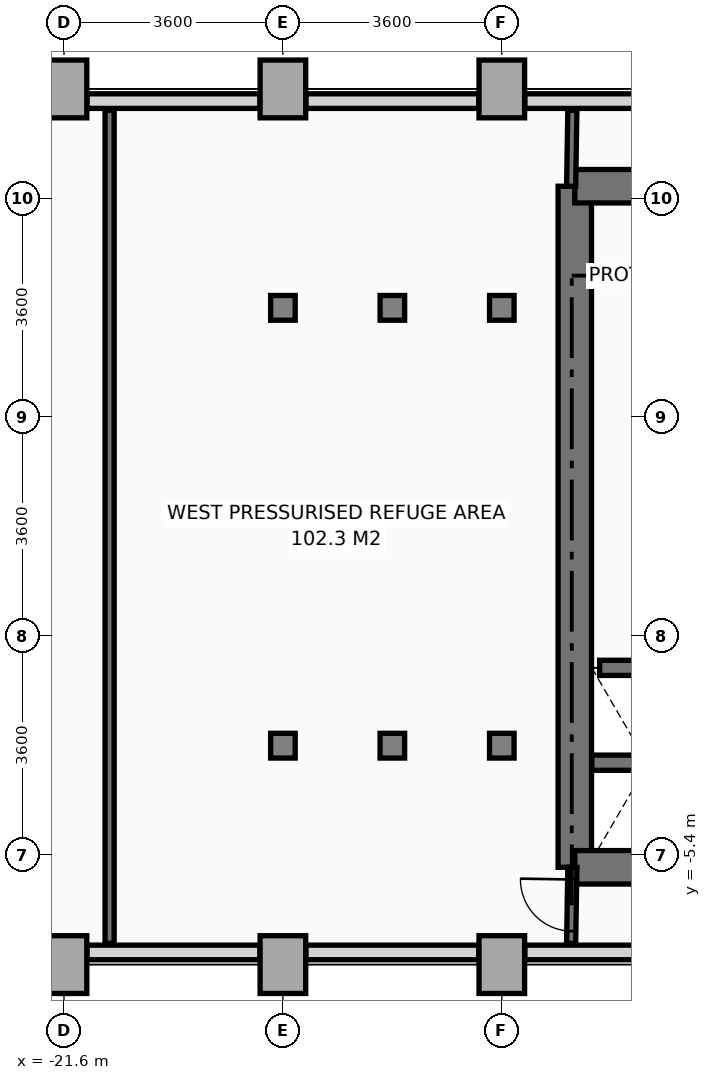
"""IFC4 building model, lengths in metres.
Left out: names, types, materials, properties, quantities, classifications, styles, units other than length and angle.
Written with IfcOpenShell. Run it as: python <this file> out.ifc"""

import sys

from ifc_helpers import new_model, si_unit, direction, frame, frame_2d, origin, origin_2d, place, context, subcontext, project, spatial, rectangle, i_section, extrude, source, transform, mapped, element, fill, save


model = new_model("IFC4")
c1 = context("Model", 3, precision=1e-05, world=origin(), true_north=direction((0.0, 1.0)))
c2 = subcontext(c1, "Body", "Model", "MODEL_VIEW")
j1 = project(units=[si_unit("LENGTHUNIT", "METRE"), si_unit("PLANEANGLEUNIT", "RADIAN")], contexts=[c1])
p1 = place(None, origin())
s1 = spatial("IfcSite", under=j1, at=p1, CompositionType="ELEMENT")
p2 = place(p1, origin())
s2 = spatial("IfcBuilding", under=s1, at=p2, CompositionType="ELEMENT")
p3 = place(p2, frame((0.0, 0.0, 88.4)))
s3 = spatial("IfcBuildingStorey", under=s2, at=p3, CompositionType="ELEMENT", Elevation=88.4)
m1 = source(origin(), c2, "Body", "SweptSolid", [
    extrude(rectangle(XDim=0.75, YDim=0.95, at=origin_2d()), origin(), (0.0, 0.0, 1.0), 4.4),
])
for number, where, z_axis, x_axis in (
    (1, (-21.6, -7.2, 0.0), (0.0, 0.0, 1.0), (1.0, 0.0, 0.0)),
    (2, (-21.6, 7.2, 0.0), (0.0, 0.0, 1.0), (1.0, 0.0, 0.0)),
    (3, (-18.0, -7.2, 0.0), (0.0, 0.0, 1.0), (1.0, 0.0, 0.0)),
):
    element("IfcColumn", number, at=place(p3, frame(where, z_axis=z_axis, x_axis=x_axis)), inside=s3, PredefinedType="COLUMN", context=c2, shape_type="MappedRepresentation", body=[
        mapped(m1, transform((0.0, 0.0, 0.0), x_axis=(1.0, 0.0, 0.0), y_axis=(0.0, 1.0, 0.0), z_axis=(0.0, 0.0, 1.0), scale=1.0)),
    ])
m2 = source(origin(), c2, "Body", "SweptSolid", [
    extrude(i_section(OverallWidth=0.404, OverallDepth=0.407, WebThickness=0.022, FlangeThickness=0.035, at=origin_2d()), origin(), (0.0, 0.0, 1.0), 4.4),
])
for number, where, z_axis, x_axis in (
    (4, (-18.0, -3.6, 0.0), (0.0, 0.0, 1.0), (1.0, 0.0, 0.0)),
    (5, (-18.0, 3.6, 0.0), (0.0, 0.0, 1.0), (1.0, 0.0, 0.0)),
):
    element("IfcColumn", number, at=place(p3, frame(where, z_axis=z_axis, x_axis=x_axis)), inside=s3, PredefinedType="COLUMN", context=c2, shape_type="MappedRepresentation", body=[
        mapped(m2, transform((0.0, 0.0, 0.0), x_axis=(1.0, 0.0, 0.0), y_axis=(0.0, 1.0, 0.0), z_axis=(0.0, 0.0, 1.0), scale=1.0)),
    ])
p4 = place(p3, frame((-18.0, 7.2, 0.0), z_axis=(0.0, 0.0, 1.0), x_axis=(1.0, 0.0, 0.0)))
e6 = element("IfcColumn", 6, at=p4, inside=s3, PredefinedType="COLUMN", context=c2, shape_type="MappedRepresentation", body=[
    mapped(m1, transform((0.0, 0.0, 0.0), x_axis=(1.0, 0.0, 0.0), y_axis=(0.0, 1.0, 0.0), z_axis=(0.0, 0.0, 1.0), scale=1.0)),
])
for number, where, z_axis, x_axis in (
    (7, (-16.2, -3.6, 0.0), (0.0, 0.0, 1.0), (1.0, 0.0, 0.0)),
    (8, (-16.2, 3.6, 0.0), (0.0, 0.0, 1.0), (1.0, 0.0, 0.0)),
):
    element("IfcColumn", number, at=place(p3, frame(where, z_axis=z_axis, x_axis=x_axis)), inside=s3, PredefinedType="COLUMN", context=c2, shape_type="MappedRepresentation", body=[
        mapped(m2, transform((0.0, 0.0, 0.0), x_axis=(1.0, 0.0, 0.0), y_axis=(0.0, 1.0, 0.0), z_axis=(0.0, 0.0, 1.0), scale=1.0)),
    ])
p5 = place(p3, frame((-14.4, -7.2, 0.0), z_axis=(0.0, 0.0, 1.0), x_axis=(1.0, 0.0, 0.0)))
e9 = element("IfcColumn", 9, at=p5, inside=s3, PredefinedType="COLUMN", context=c2, shape_type="MappedRepresentation", body=[
    mapped(m1, transform((0.0, 0.0, 0.0), x_axis=(1.0, 0.0, 0.0), y_axis=(0.0, 1.0, 0.0), z_axis=(0.0, 0.0, 1.0), scale=1.0)),
])
for number, where, z_axis, x_axis in (
    (10, (-14.4, -3.6, 0.0), (0.0, 0.0, 1.0), (1.0, 0.0, 0.0)),
    (11, (-14.4, 3.6, 0.0), (0.0, 0.0, 1.0), (1.0, 0.0, 0.0)),
):
    element("IfcColumn", number, at=place(p3, frame(where, z_axis=z_axis, x_axis=x_axis)), inside=s3, PredefinedType="COLUMN", context=c2, shape_type="MappedRepresentation", body=[
        mapped(m2, transform((0.0, 0.0, 0.0), x_axis=(1.0, 0.0, 0.0), y_axis=(0.0, 1.0, 0.0), z_axis=(0.0, 0.0, 1.0), scale=1.0)),
    ])
p6 = place(p3, frame((-14.4, 7.2, 0.0), z_axis=(0.0, 0.0, 1.0), x_axis=(1.0, 0.0, 0.0)))
e12 = element("IfcColumn", 12, at=p6, inside=s3, PredefinedType="COLUMN", context=c2, shape_type="MappedRepresentation", body=[
    mapped(m1, transform((0.0, 0.0, 0.0), x_axis=(1.0, 0.0, 0.0), y_axis=(0.0, 1.0, 0.0), z_axis=(0.0, 0.0, 1.0), scale=1.0)),
])
p7 = place(p3, frame((-9.523, -7.0, 0.0), z_axis=(0.0, 0.0, 1.0), x_axis=(-1.0, 0.0, 0.0)))
e13 = element("IfcWall", 13, at=p7, inside=s3, PredefinedType="PARAPET", context=c2, shape_type="SweptSolid", body=[
    extrude(rectangle(XDim=4.499, YDim=0.24, at=frame_2d((2.25, 0.0))), origin(), (0.0, 0.0, 1.0), 1.15),
])
for number, where, z_axis, x_axis in (
    (14, (-14.778, -7.0, 0.0), (0.0, 0.0, 1.0), (-1.0, 0.0, 0.0)),
    (15, (-18.378, -7.0, 0.0), (0.0, 0.0, 1.0), (-1.0, 0.0, 0.0)),
    (16, (-21.222, 7.0, 0.0), (0.0, 0.0, 1.0), (1.0, 0.0, 0.0)),
    (17, (-17.622, 7.0, 0.0), (0.0, 0.0, 1.0), (1.0, 0.0, 0.0)),
):
    element("IfcWall", number, at=place(p3, frame(where, z_axis=z_axis, x_axis=x_axis)), inside=s3, PredefinedType="PARAPET", context=c2, shape_type="SweptSolid", body=[
        extrude(rectangle(XDim=2.844, YDim=0.24, at=frame_2d((1.422, 0.0))), origin(), (0.0, 0.0, 1.0), 1.15),
    ])
p8 = place(p3, frame((-14.022, 7.0, 0.0), z_axis=(0.0, 0.0, 1.0), x_axis=(1.0, 0.0, 0.0)))
e18 = element("IfcWall", 18, at=p8, inside=s3, PredefinedType="PARAPET", context=c2, shape_type="SweptSolid", body=[
    extrude(rectangle(XDim=2.619, YDim=0.24, at=frame_2d((1.31, 0.0))), origin(), (0.0, 0.0, 1.0), 1.15),
])
p9 = place(p3, frame((-13.2, -5.6, 0.0), z_axis=(0.0, 0.0, 1.0), x_axis=(0.0, 1.0, 0.0)))
e19 = element("IfcWall", 19, at=p9, inside=s3, PredefinedType="SHEAR", context=c2, shape_type="SweptSolid", body=[
    extrude(rectangle(XDim=11.2, YDim=0.55, at=frame_2d((5.6, 0.0))), origin(), (0.0, 0.0, 1.0), 4.4),
])
p10 = place(p3, frame((-13.2, 5.6, 0.0), z_axis=(0.0, 0.0, 1.0), x_axis=(1.0, 0.0, 0.0)))
e20 = element("IfcWall", 20, at=p10, inside=s3, PredefinedType="SHEAR", context=c2, shape_type="SweptSolid", body=[
    extrude(rectangle(XDim=1.819, YDim=0.55, at=frame_2d((0.909, 0.0))), origin(), (0.0, 0.0, 1.0), 4.4),
])
p11 = place(p3, frame((-13.2, -5.6, 0.0), z_axis=(0.0, 0.0, 1.0), x_axis=(1.0, 0.0, 0.0)))
e21 = element("IfcWall", 21, at=p11, inside=s3, PredefinedType="SHEAR", context=c2, shape_type="SweptSolid", body=[
    extrude(rectangle(XDim=7.8, YDim=0.55, at=frame_2d((3.9, 0.0))), origin(), (0.0, 0.0, 1.0), 4.4),
])
p12 = place(p11, frame((3.6, 0.0, 0.0)))
e22 = element("IfcOpeningElement", 22, at=p12, cuts=e21, PredefinedType="OPENING", context=c2, shape_type="SweptSolid", body=[
    extrude(rectangle(XDim=1.2, YDim=2.2, at=frame_2d((0.6, 1.1))), frame((0.0, 0.285, 0.0), z_axis=(0.0, -1.0, 0.0), x_axis=(1.0, 0.0, 0.0)), (0.0, 0.0, 1.0), 0.57),
])
p13 = place(p3, frame((-12.92, -3.88, 0.0), z_axis=(0.0, 0.0, 1.0), x_axis=(1.0, 0.0, 0.0)))
e23 = element("IfcWall", 23, at=p13, inside=s3, PredefinedType="SOLIDWALL", context=c2, shape_type="SweptSolid", body=[
    extrude(rectangle(XDim=1.84, YDim=0.25, at=frame_2d((0.92, 0.0))), origin(), (0.0, 0.0, 1.0), 4.4),
])
p14 = place(p3, frame((-12.791, -2.32, 0.0), z_axis=(0.0, 0.0, 1.0), x_axis=(1.0, 0.0, 0.0)))
e24 = element("IfcWall", 24, at=p14, inside=s3, PredefinedType="SOLIDWALL", context=c2, shape_type="SweptSolid", body=[
    extrude(rectangle(XDim=1.582, YDim=0.25, at=frame_2d((0.791, 0.0))), origin(), (0.0, 0.0, 1.0), 4.4),
])
p15 = place(p3, frame((-13.26, -6.85, 0.0), z_axis=(0.0, 0.0, 1.0), x_axis=(0.016013571389, 0.999871774545, 0.0)))
e25 = element("IfcWall", 25, at=p15, inside=s3, PredefinedType="PARTITIONING", context=c2, shape_type="SweptSolid", body=[
    extrude(rectangle(XDim=1.25, YDim=0.15, at=frame_2d((0.625, 0.0))), origin(), (0.0, 0.0, 1.0), 4.4),
])
p16 = place(p15, frame((0.2, 0.0, 0.0)))
e26 = element("IfcOpeningElement", 26, at=p16, cuts=e25, PredefinedType="OPENING", context=c2, shape_type="SweptSolid", body=[
    extrude(rectangle(XDim=0.85, YDim=2.1, at=frame_2d((0.425, 1.05))), frame((0.0, 0.085, 0.0), z_axis=(0.0, -1.0, 0.0), x_axis=(1.0, 0.0, 0.0)), (0.0, 0.0, 1.0), 0.17),
])
p17 = place(p3, frame((-13.26, 5.6, 0.0), z_axis=(0.0, 0.0, 1.0), x_axis=(0.016013571389, 0.999871774545, 0.0)))
e27 = element("IfcWall", 27, at=p17, inside=s3, PredefinedType="PARTITIONING", context=c2, shape_type="SweptSolid", body=[
    extrude(rectangle(XDim=1.25, YDim=0.15, at=frame_2d((0.625, 0.0))), origin(), (0.0, 0.0, 1.0), 4.4),
])
p18 = place(p3, frame((-20.85, -6.85, 0.0), z_axis=(0.0, 0.0, 1.0), x_axis=(0.0, 1.0, 0.0)))
e28 = element("IfcWall", 28, at=p18, inside=s3, PredefinedType="PARTITIONING", context=c2, shape_type="SweptSolid", body=[
    extrude(rectangle(XDim=13.7, YDim=0.15, at=frame_2d((6.85, 0.0))), origin(), (0.0, 0.0, 1.0), 3.91),
])
m3 = source(origin(), c2, "Body", "SweptSolid", [
    extrude(rectangle(XDim=0.85, YDim=2.1, at=frame_2d((0.425, 1.05))), frame((0.0, 0.025, 0.0), z_axis=(0.0, -1.0, 0.0), x_axis=(1.0, 0.0, 0.0)), (0.0, 0.0, 1.0), 0.05),
])
p19 = place(p16, origin())
e29 = element("IfcDoor", 29, at=p19, inside=s3, OperationType="SINGLE_SWING_RIGHT", PredefinedType="DOOR", context=c2, shape_type="MappedRepresentation", body=[
    mapped(m3, transform((0.0, 0.0, 0.0), x_axis=(1.0, 0.0, 0.0), y_axis=(0.0, 1.0, 0.0), z_axis=(0.0, 0.0, 1.0), scale=1.0)),
])
fill(e26, e29)
save(model, sys.argv[1])
